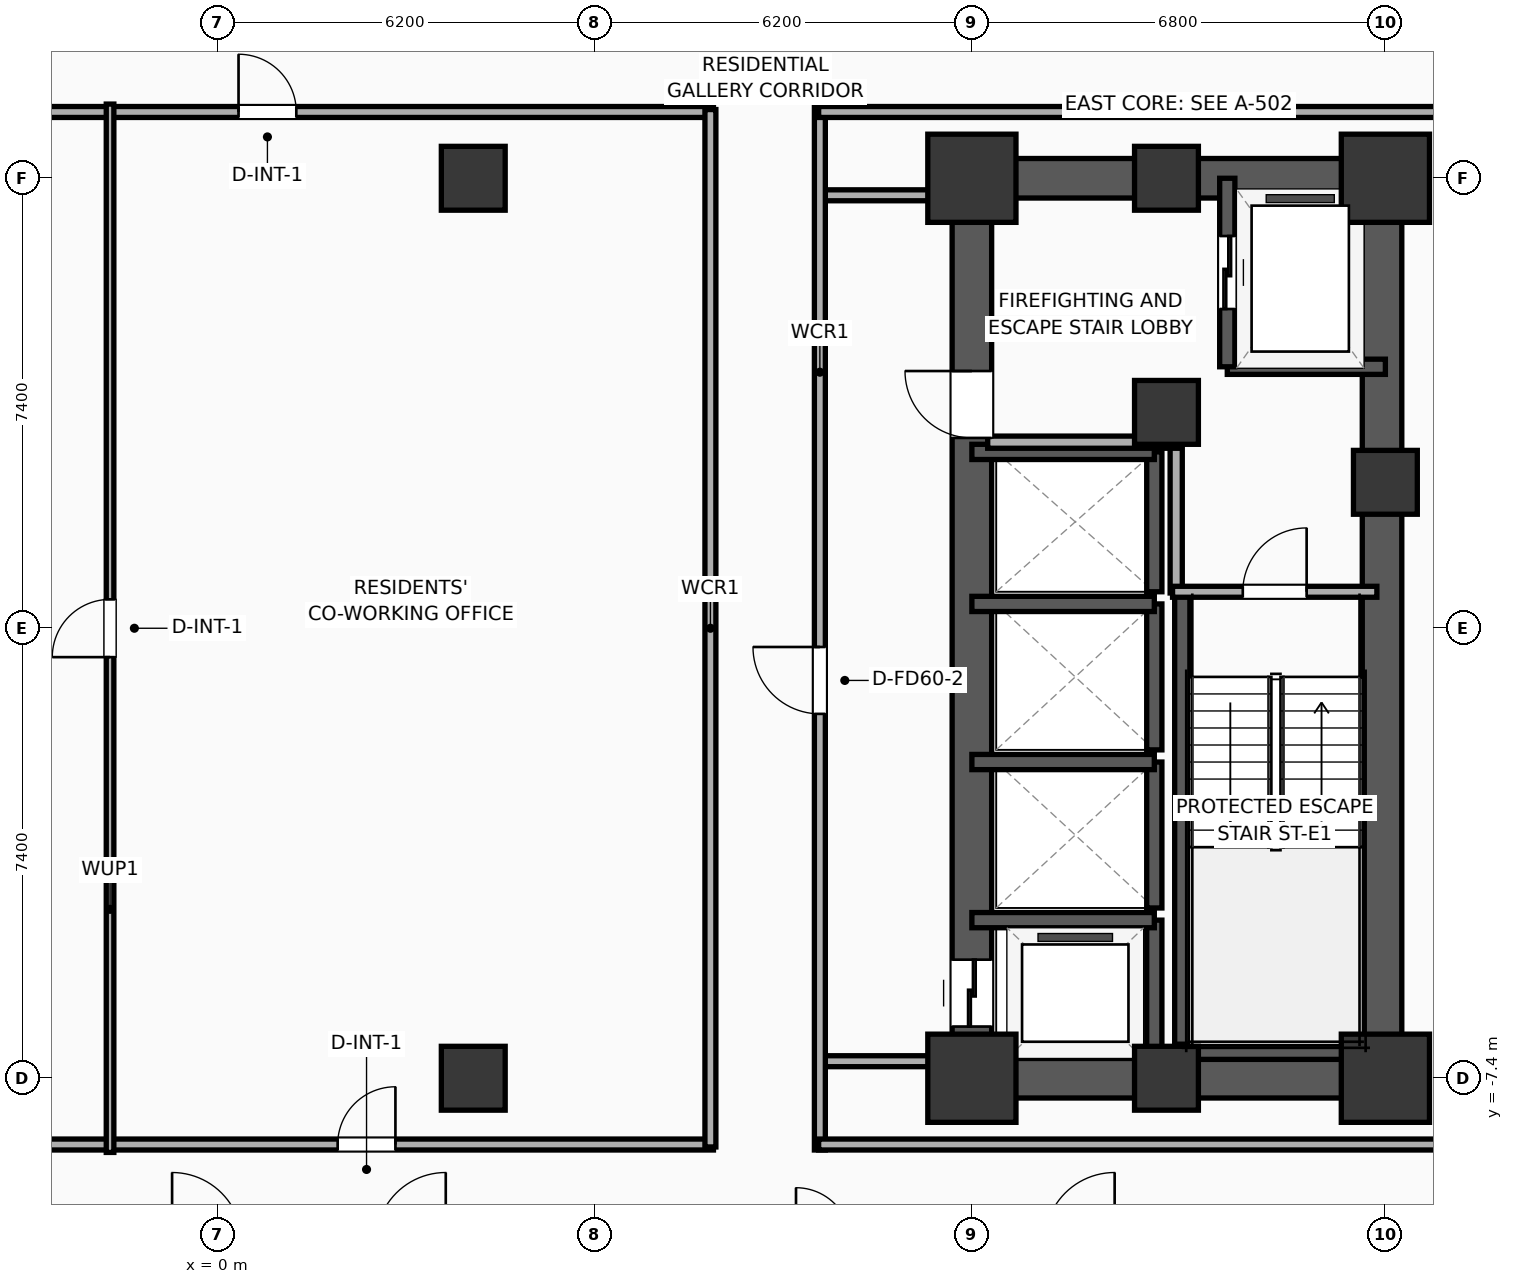
"""IFC4 building model, lengths in metres.
Left out: names, types, materials, properties, quantities, classifications, styles, units other than length and angle.
Written with IfcOpenShell. Run it as: python <this file> out.ifc"""

import sys

from ifc_helpers import new_model, si_unit, direction, frame, frame_2d, origin, origin_2d, place, context, subcontext, project, spatial, rectangle, extrude, element, fill, save


model = new_model("IFC4")
c1 = context("Model", 3, precision=1e-05, world=origin(), true_north=direction((0.0, 1.0)))
c2 = subcontext(c1, "Body", "Model", "MODEL_VIEW")
j1 = project(units=[si_unit("LENGTHUNIT", "METRE"), si_unit("PLANEANGLEUNIT", "RADIAN")], contexts=[c1])
p1 = place(None, origin())
s1 = spatial("IfcSite", under=j1, at=p1, CompositionType="ELEMENT")
p2 = place(p1, origin())
s2 = spatial("IfcBuilding", under=s1, at=p2, CompositionType="ELEMENT")
p3 = place(p2, frame((0.0, 0.0, 33.8)))
s3 = spatial("IfcBuildingStorey", under=s2, at=p3, CompositionType="ELEMENT", Elevation=33.8)
p4 = place(p3, frame((12.4, -7.4, 0.0), z_axis=(0.0, 0.0, 1.0), x_axis=(1.0, 0.0, 0.0)))
e1 = element("IfcColumn", 1, at=p4, inside=s3, PredefinedType="COLUMN", context=c2, shape_type="SweptSolid", body=[
    extrude(rectangle(XDim=1.45, YDim=1.45, at=origin_2d()), origin(), (0.0, 0.0, 1.0), 3.9),
])
p5 = place(p3, frame((15.6, 3.55, 0.0), z_axis=(0.0, 0.0, 1.0), x_axis=(1.0, 0.0, 0.0)))
e2 = element("IfcColumn", 2, at=p5, inside=s3, PredefinedType="COLUMN", context=c2, shape_type="SweptSolid", body=[
    extrude(rectangle(XDim=1.05, YDim=1.05, at=origin_2d()), origin(), (0.0, 0.0, 1.0), 3.9),
])
p6 = place(p3, frame((12.4, 7.4, 0.0), z_axis=(0.0, 0.0, 1.0), x_axis=(1.0, 0.0, 0.0)))
e3 = element("IfcColumn", 3, at=p6, inside=s3, PredefinedType="COLUMN", context=c2, shape_type="SweptSolid", body=[
    extrude(rectangle(XDim=1.45, YDim=1.45, at=origin_2d()), origin(), (0.0, 0.0, 1.0), 3.9),
])
for number, where, z_axis, x_axis in (
    (4, (15.6, -7.4, 0.0), (0.0, 0.0, 1.0), (1.0, 0.0, 0.0)),
    (5, (15.6, 7.4, 0.0), (0.0, 0.0, 1.0), (1.0, 0.0, 0.0)),
):
    element("IfcColumn", number, at=place(p3, frame(where, z_axis=z_axis, x_axis=x_axis)), inside=s3, PredefinedType="COLUMN", context=c2, shape_type="SweptSolid", body=[
        extrude(rectangle(XDim=1.05, YDim=1.05, at=origin_2d()), origin(), (0.0, 0.0, 1.0), 3.9),
    ])
p7 = place(p3, frame((19.2, -7.4, 0.0), z_axis=(0.0, 0.0, 1.0), x_axis=(1.0, 0.0, 0.0)))
e6 = element("IfcColumn", 6, at=p7, inside=s3, PredefinedType="COLUMN", context=c2, shape_type="SweptSolid", body=[
    extrude(rectangle(XDim=1.45, YDim=1.45, at=origin_2d()), origin(), (0.0, 0.0, 1.0), 3.9),
])
p8 = place(p3, frame((19.2, 2.4, 0.0), z_axis=(0.0, 0.0, 1.0), x_axis=(1.0, 0.0, 0.0)))
e7 = element("IfcColumn", 7, at=p8, inside=s3, PredefinedType="COLUMN", context=c2, shape_type="SweptSolid", body=[
    extrude(rectangle(XDim=1.05, YDim=1.05, at=origin_2d()), origin(), (0.0, 0.0, 1.0), 3.9),
])
p9 = place(p3, frame((19.2, 7.4, 0.0), z_axis=(0.0, 0.0, 1.0), x_axis=(1.0, 0.0, 0.0)))
e8 = element("IfcColumn", 8, at=p9, inside=s3, PredefinedType="COLUMN", context=c2, shape_type="SweptSolid", body=[
    extrude(rectangle(XDim=1.45, YDim=1.45, at=origin_2d()), origin(), (0.0, 0.0, 1.0), 3.9),
])
for number, where, z_axis, x_axis in (
    (9, (12.075, -7.4, 0.0), (0.0, 0.0, 1.0), (1.0, 0.0, 0.0)),
    (10, (12.075, 7.4, 0.0), (0.0, 0.0, 1.0), (1.0, 0.0, 0.0)),
):
    element("IfcWall", number, at=place(p3, frame(where, z_axis=z_axis, x_axis=x_axis)), inside=s3, PredefinedType="SHEAR", context=c2, shape_type="SweptSolid", body=[
        extrude(rectangle(XDim=7.45, YDim=0.65, at=frame_2d((3.725, 0.0))), origin(), (0.0, 0.0, 1.0), 3.65),
    ])
p10 = place(p3, frame((12.4, -7.4, 0.0), z_axis=(0.0, 0.0, 1.0), x_axis=(0.0, 1.0, 0.0)))
e11 = element("IfcWall", 11, at=p10, inside=s3, PredefinedType="SHEAR", context=c2, shape_type="SweptSolid", body=[
    extrude(rectangle(XDim=14.8, YDim=0.65, at=frame_2d((7.4, 0.0))), origin(), (0.0, 0.0, 1.0), 3.65),
])
p11 = place(p10, frame((0.85, 0.0, 0.0)))
e12 = element("IfcOpeningElement", 12, at=p11, cuts=e11, PredefinedType="OPENING", context=c2, shape_type="SweptSolid", body=[
    extrude(rectangle(XDim=1.1, YDim=2.05, at=frame_2d((0.55, 1.025))), frame((0.0, 0.335, 0.0), z_axis=(0.0, -1.0, 0.0), x_axis=(1.0, 0.0, 0.0)), (0.0, 0.0, 1.0), 0.67),
])
p12 = place(p10, frame((10.53, 0.0, 0.0)))
e13 = element("IfcOpeningElement", 13, at=p12, cuts=e11, PredefinedType="OPENING", context=c2, shape_type="SweptSolid", body=[
    extrude(rectangle(XDim=1.1, YDim=2.05, at=frame_2d((0.55, 1.025))), frame((0.0, 0.335, 0.0), z_axis=(0.0, -1.0, 0.0), x_axis=(1.0, 0.0, 0.0)), (0.0, 0.0, 1.0), 0.67),
])
p13 = place(p3, frame((19.145, -7.4, 0.0), z_axis=(0.0, 0.0, 1.0), x_axis=(0.0, 1.0, 0.0)))
e14 = element("IfcWall", 14, at=p13, inside=s3, PredefinedType="SHEAR", context=c2, shape_type="SweptSolid", body=[
    extrude(rectangle(XDim=14.8, YDim=0.65, at=frame_2d((7.4, 0.0))), origin(), (0.0, 0.0, 1.0), 3.65),
])
p14 = place(p3, frame((15.86, -7.085, 0.0), z_axis=(0.0, 0.0, 1.0), x_axis=(0.0, 1.0, 0.0)))
e15 = element("IfcWall", 15, at=p14, inside=s3, PredefinedType="SOLIDWALL", context=c2, shape_type="SweptSolid", body=[
    extrude(rectangle(XDim=7.685, YDim=0.25, at=frame_2d((3.843, 0.0))), origin(), (0.0, 0.0, 1.0), 3.65),
])
p15 = place(p3, frame((15.74, -6.965, 0.0), z_axis=(0.0, 0.0, 1.0), x_axis=(1.0, 0.0, 0.0)))
e16 = element("IfcWall", 16, at=p15, inside=s3, PredefinedType="SOLIDWALL", context=c2, shape_type="SweptSolid", body=[
    extrude(rectangle(XDim=3.46, YDim=0.25, at=frame_2d((1.73, 0.0))), origin(), (0.0, 0.0, 1.0), 3.65),
])
for number, where, z_axis, x_axis in (
    (17, (4.2, -7.4, 0.0), (0.0, 0.0, 1.0), (1.0, 0.0, 0.0)),
    (18, (4.2, 7.4, 0.0), (0.0, 0.0, 1.0), (1.0, 0.0, 0.0)),
):
    element("IfcColumn", number, at=place(p3, frame(where, z_axis=z_axis, x_axis=x_axis)), inside=s3, PredefinedType="COLUMN", context=c2, shape_type="SweptSolid", body=[
        extrude(rectangle(XDim=1.05, YDim=1.05, at=origin_2d()), origin(), (0.0, 0.0, 1.0), 3.9),
    ])
p16 = place(p3, frame((16.6, 4.3, 0.0), z_axis=(0.0, 0.0, 1.0), x_axis=(1.0, 0.0, 0.0)))
e19 = element("IfcWall", 19, at=p16, inside=s3, PredefinedType="SOLIDWALL", context=c2, shape_type="SweptSolid", body=[
    extrude(rectangle(XDim=2.6, YDim=0.25, at=frame_2d((1.3, 0.0))), origin(), (0.0, 0.0, 1.0), 3.65),
])
p17 = place(p3, frame((16.6, 7.4, 0.0), z_axis=(0.0, 0.0, 1.0), x_axis=(0.0, -1.0, 0.0)))
e20 = element("IfcWall", 20, at=p17, inside=s3, PredefinedType="SOLIDWALL", context=c2, shape_type="SweptSolid", body=[
    extrude(rectangle(XDim=3.1, YDim=0.25, at=frame_2d((1.55, 0.0))), origin(), (0.0, 0.0, 1.0), 3.65),
])
p18 = place(p17, frame((0.95, 0.0, 0.0)))
e21 = element("IfcOpeningElement", 21, at=p18, cuts=e20, PredefinedType="OPENING", context=c2, shape_type="SweptSolid", body=[
    extrude(rectangle(XDim=1.2, YDim=2.05, at=frame_2d((0.6, 1.025))), frame((0.0, 0.135, 0.0), z_axis=(0.0, -1.0, 0.0), x_axis=(1.0, 0.0, 0.0)), (0.0, 0.0, 1.0), 0.27),
])
p19 = place(p3, frame((15.4, -7.4, 0.0), z_axis=(0.0, 0.0, 1.0), x_axis=(0.0, 1.0, 0.0)))
e22 = element("IfcWall", 22, at=p19, inside=s3, PredefinedType="SOLIDWALL", context=c2, shape_type="SweptSolid", body=[
    extrude(rectangle(XDim=2.6, YDim=0.25, at=frame_2d((1.3, 0.0))), origin(), (0.0, 0.0, 1.0), 3.65),
])
p20 = place(p3, frame((15.4, -4.8, 0.0), z_axis=(0.0, 0.0, 1.0), x_axis=(-1.0, 0.0, 0.0)))
e23 = element("IfcWall", 23, at=p20, inside=s3, PredefinedType="SOLIDWALL", context=c2, shape_type="SweptSolid", body=[
    extrude(rectangle(XDim=3.0, YDim=0.25, at=frame_2d((1.5, 0.0))), origin(), (0.0, 0.0, 1.0), 3.65),
])
p21 = place(p3, frame((15.4, -4.6, 0.0), z_axis=(0.0, 0.0, 1.0), x_axis=(0.0, 1.0, 0.0)))
e24 = element("IfcWall", 24, at=p21, inside=s3, PredefinedType="SOLIDWALL", context=c2, shape_type="SweptSolid", body=[
    extrude(rectangle(XDim=2.4, YDim=0.25, at=frame_2d((1.2, 0.0))), origin(), (0.0, 0.0, 1.0), 3.65),
])
p22 = place(p3, frame((15.4, -2.2, 0.0), z_axis=(0.0, 0.0, 1.0), x_axis=(-1.0, 0.0, 0.0)))
e25 = element("IfcWall", 25, at=p22, inside=s3, PredefinedType="SOLIDWALL", context=c2, shape_type="SweptSolid", body=[
    extrude(rectangle(XDim=3.0, YDim=0.25, at=frame_2d((1.5, 0.0))), origin(), (0.0, 0.0, 1.0), 3.65),
])
p23 = place(p3, frame((15.4, -2.0, 0.0), z_axis=(0.0, 0.0, 1.0), x_axis=(0.0, 1.0, 0.0)))
e26 = element("IfcWall", 26, at=p23, inside=s3, PredefinedType="SOLIDWALL", context=c2, shape_type="SweptSolid", body=[
    extrude(rectangle(XDim=2.4, YDim=0.25, at=frame_2d((1.2, 0.0))), origin(), (0.0, 0.0, 1.0), 3.65),
])
p24 = place(p3, frame((15.4, 0.4, 0.0), z_axis=(0.0, 0.0, 1.0), x_axis=(-1.0, 0.0, 0.0)))
e27 = element("IfcWall", 27, at=p24, inside=s3, PredefinedType="SOLIDWALL", context=c2, shape_type="SweptSolid", body=[
    extrude(rectangle(XDim=3.0, YDim=0.25, at=frame_2d((1.5, 0.0))), origin(), (0.0, 0.0, 1.0), 3.65),
])
p25 = place(p3, frame((15.4, 0.6, 0.0), z_axis=(0.0, 0.0, 1.0), x_axis=(0.0, 1.0, 0.0)))
e28 = element("IfcWall", 28, at=p25, inside=s3, PredefinedType="SOLIDWALL", context=c2, shape_type="SweptSolid", body=[
    extrude(rectangle(XDim=2.3, YDim=0.25, at=frame_2d((1.15, 0.0))), origin(), (0.0, 0.0, 1.0), 3.65),
])
p26 = place(p3, frame((15.4, 2.9, 0.0), z_axis=(0.0, 0.0, 1.0), x_axis=(-1.0, 0.0, 0.0)))
e29 = element("IfcWall", 29, at=p26, inside=s3, PredefinedType="SOLIDWALL", context=c2, shape_type="SweptSolid", body=[
    extrude(rectangle(XDim=3.0, YDim=0.25, at=frame_2d((1.5, 0.0))), origin(), (0.0, 0.0, 1.0), 3.65),
])
p27 = place(p3, frame((15.76, 0.58, 0.0), z_axis=(0.0, 0.0, 1.0), x_axis=(0.0, 1.0, 0.0)))
e30 = element("IfcWall", 30, at=p27, inside=s3, PredefinedType="PARTITIONING", context=c2, shape_type="SweptSolid", body=[
    extrude(rectangle(XDim=2.52, YDim=0.2, at=frame_2d((1.26, 0.0))), origin(), (0.0, 0.0, 1.0), 3.65),
])
p28 = place(p3, frame((12.66, 3.06, 0.0), z_axis=(0.0, 0.0, 1.0), x_axis=(1.0, 0.0, 0.0)))
e31 = element("IfcWall", 31, at=p28, inside=s3, PredefinedType="PARTITIONING", context=c2, shape_type="SweptSolid", body=[
    extrude(rectangle(XDim=3.16, YDim=0.2, at=frame_2d((1.58, 0.0))), origin(), (0.0, 0.0, 1.0), 3.65),
])
p29 = place(p3, frame((15.7, 0.6, 0.0), z_axis=(0.0, 0.0, 1.0), x_axis=(1.0, 0.0, 0.0)))
e32 = element("IfcWall", 32, at=p29, inside=s3, PredefinedType="PARTITIONING", context=c2, shape_type="SweptSolid", body=[
    extrude(rectangle(XDim=3.36, YDim=0.18, at=frame_2d((1.68, 0.0))), origin(), (0.0, 0.0, 1.0), 3.65),
])
p30 = place(p29, frame((1.155, 0.0, 0.0)))
e33 = element("IfcOpeningElement", 33, at=p30, cuts=e32, PredefinedType="OPENING", context=c2, shape_type="SweptSolid", body=[
    extrude(rectangle(XDim=1.05, YDim=2.05, at=frame_2d((0.525, 1.025))), frame((0.0, 0.1, 0.0), z_axis=(0.0, -1.0, 0.0), x_axis=(1.0, 0.0, 0.0)), (0.0, 0.0, 1.0), 0.2),
])
for number, where, z_axis, x_axis in (
    (34, (9.88, 7.12, 0.0), (0.0, 0.0, 1.0), (1.0, 0.0, 0.0)),
    (35, (9.88, -7.12, 0.0), (0.0, 0.0, 1.0), (1.0, 0.0, 0.0)),
):
    element("IfcWall", number, at=place(p3, frame(where, z_axis=z_axis, x_axis=x_axis)), inside=s3, PredefinedType="PARTITIONING", context=c2, shape_type="SweptSolid", body=[
        extrude(rectangle(XDim=2.27, YDim=0.18, at=frame_2d((1.135, 0.0))), origin(), (0.0, 0.0, 1.0), 2.94),
    ])
p31 = place(p3, frame((9.9, -8.58, 0.0), z_axis=(0.0, 0.0, 1.0), x_axis=(0.0, 1.0, 0.0)))
e36 = element("IfcWall", 36, at=p31, inside=s3, PredefinedType="PARTITIONING", context=c2, shape_type="SweptSolid", body=[
    extrude(rectangle(XDim=17.16, YDim=0.18, at=frame_2d((8.58, 0.0))), origin(), (0.0, 0.0, 1.0), 3.65),
])
p32 = place(p31, frame((7.172, 0.0, 0.0)))
e37 = element("IfcOpeningElement", 37, at=p32, cuts=e36, PredefinedType="OPENING", context=c2, shape_type="SweptSolid", body=[
    extrude(rectangle(XDim=1.1, YDim=2.05, at=frame_2d((0.55, 1.025))), frame((0.0, 0.1, 0.0), z_axis=(0.0, -1.0, 0.0), x_axis=(1.0, 0.0, 0.0)), (0.0, 0.0, 1.0), 0.2),
])
p33 = place(p3, frame((9.88, 8.49, 0.0), z_axis=(0.0, 0.0, 1.0), x_axis=(1.0, 0.0, 0.0)))
e38 = element("IfcWall", 38, at=p33, inside=s3, PredefinedType="PARTITIONING", context=c2, shape_type="SweptSolid", body=[
    extrude(rectangle(XDim=16.33, YDim=0.18, at=frame_2d((8.165, 0.0))), origin(), (0.0, 0.0, 1.0), 3.65),
])
p34 = place(p33, frame((14.365, 0.0, 0.0)))
e39 = element("IfcOpeningElement", 39, at=p34, cuts=e38, PredefinedType="OPENING", context=c2, shape_type="SweptSolid", body=[
    extrude(rectangle(XDim=0.9, YDim=2.05, at=frame_2d((0.45, 1.025))), frame((0.0, 0.1, 0.0), z_axis=(0.0, -1.0, 0.0), x_axis=(1.0, 0.0, 0.0)), (0.0, 0.0, 1.0), 0.2),
])
p35 = place(p3, frame((9.88, -8.49, 0.0), z_axis=(0.0, 0.0, 1.0), x_axis=(1.0, 0.0, 0.0)))
e40 = element("IfcWall", 40, at=p35, inside=s3, PredefinedType="PARTITIONING", context=c2, shape_type="SweptSolid", body=[
    extrude(rectangle(XDim=16.33, YDim=0.18, at=frame_2d((8.165, 0.0))), origin(), (0.0, 0.0, 1.0), 3.65),
])
p36 = place(p3, frame((-8.15, 8.49, 0.0), z_axis=(0.0, 0.0, 1.0), x_axis=(1.0, 0.0, 0.0)))
e41 = element("IfcWall", 41, at=p36, inside=s3, PredefinedType="PARTITIONING", context=c2, shape_type="SweptSolid", body=[
    extrude(rectangle(XDim=16.3, YDim=0.18, at=frame_2d((8.15, 0.0))), origin(), (0.0, 0.0, 1.0), 3.65),
])
p37 = place(p36, frame((8.49, 0.0, 0.0)))
e42 = element("IfcOpeningElement", 42, at=p37, cuts=e41, PredefinedType="OPENING", context=c2, shape_type="SweptSolid", body=[
    extrude(rectangle(XDim=0.95, YDim=2.05, at=frame_2d((0.475, 1.025))), frame((0.0, 0.1, 0.0), z_axis=(0.0, -1.0, 0.0), x_axis=(1.0, 0.0, 0.0)), (0.0, 0.0, 1.0), 0.2),
])
p38 = place(p3, frame((-8.15, -8.49, 0.0), z_axis=(0.0, 0.0, 1.0), x_axis=(1.0, 0.0, 0.0)))
e43 = element("IfcWall", 43, at=p38, inside=s3, PredefinedType="PARTITIONING", context=c2, shape_type="SweptSolid", body=[
    extrude(rectangle(XDim=16.3, YDim=0.18, at=frame_2d((8.15, 0.0))), origin(), (0.0, 0.0, 1.0), 3.65),
])
p39 = place(p38, frame((1.13, 0.0, 0.0)))
e44 = element("IfcOpeningElement", 44, at=p39, cuts=e43, PredefinedType="OPENING", context=c2, shape_type="SweptSolid", body=[
    extrude(rectangle(XDim=1.0, YDim=2.05, at=frame_2d((0.5, 1.025))), frame((0.0, 0.1, 0.0), z_axis=(0.0, -1.0, 0.0), x_axis=(1.0, 0.0, 0.0)), (0.0, 0.0, 1.0), 0.2),
])
p40 = place(p38, frame((10.12, 0.0, 0.0)))
e45 = element("IfcOpeningElement", 45, at=p40, cuts=e43, PredefinedType="OPENING", context=c2, shape_type="SweptSolid", body=[
    extrude(rectangle(XDim=0.95, YDim=2.05, at=frame_2d((0.475, 1.025))), frame((0.0, 0.1, 0.0), z_axis=(0.0, -1.0, 0.0), x_axis=(1.0, 0.0, 0.0)), (0.0, 0.0, 1.0), 0.2),
])
p41 = place(p3, frame((8.1, -8.53, 0.0), z_axis=(0.0, 0.0, 1.0), x_axis=(0.0, 1.0, 0.0)))
e46 = element("IfcWall", 46, at=p41, inside=s3, PredefinedType="PARTITIONING", context=c2, shape_type="SweptSolid", body=[
    extrude(rectangle(XDim=17.06, YDim=0.18, at=frame_2d((8.53, 0.0))), origin(), (0.0, 0.0, 1.0), 3.65),
])
p42 = place(p3, frame((-1.773, -8.62, 0.0), z_axis=(0.0, 0.0, 1.0), x_axis=(0.0, 1.0, 0.0)))
e47 = element("IfcWall", 47, at=p42, inside=s3, PredefinedType="PARTITIONING", context=c2, shape_type="SweptSolid", body=[
    extrude(rectangle(XDim=17.24, YDim=0.125, at=frame_2d((8.62, 0.0))), origin(), (0.0, 0.0, 1.0), 3.65),
])
p43 = place(p42, frame((8.145, 0.0, 0.0)))
e48 = element("IfcOpeningElement", 48, at=p43, cuts=e47, PredefinedType="OPENING", context=c2, shape_type="SweptSolid", body=[
    extrude(rectangle(XDim=0.95, YDim=2.05, at=frame_2d((0.475, 1.025))), frame((0.0, 0.073, 0.0), z_axis=(0.0, -1.0, 0.0), x_axis=(1.0, 0.0, 0.0)), (0.0, 0.0, 1.0), 0.145),
])
p44 = place(p18, origin())
e49 = element("IfcDoor", 49, at=p44, inside=s3, OperationType="SLIDING_TO_LEFT", PredefinedType="DOOR", context=c2, shape_type="SweptSolid", body=[
    extrude(rectangle(XDim=1.2, YDim=2.05, at=frame_2d((0.6, 1.025))), frame((0.0, 0.025, 0.0), z_axis=(0.0, -1.0, 0.0), x_axis=(1.0, 0.0, 0.0)), (0.0, 0.0, 1.0), 0.05),
])
fill(e21, e49)
p45 = place(p11, origin())
e50 = element("IfcDoor", 50, at=p45, inside=s3, OperationType="SLIDING_TO_LEFT", PredefinedType="DOOR", context=c2, shape_type="SweptSolid", body=[
    extrude(rectangle(XDim=1.1, YDim=2.05, at=frame_2d((0.55, 1.025))), frame((0.0, 0.025, 0.0), z_axis=(0.0, -1.0, 0.0), x_axis=(1.0, 0.0, 0.0)), (0.0, 0.0, 1.0), 0.05),
])
fill(e12, e50)
p46 = place(p30, origin())
e51 = element("IfcDoor", 51, at=p46, inside=s3, OperationType="SINGLE_SWING_RIGHT", PredefinedType="DOOR", context=c2, shape_type="SweptSolid", body=[
    extrude(rectangle(XDim=1.05, YDim=2.05, at=frame_2d((0.525, 1.025))), frame((0.0, 0.025, 0.0), z_axis=(0.0, -1.0, 0.0), x_axis=(1.0, 0.0, 0.0)), (0.0, 0.0, 1.0), 0.05),
])
fill(e33, e51)
p47 = place(p32, origin())
e52 = element("IfcDoor", 52, at=p47, inside=s3, OperationType="SINGLE_SWING_RIGHT", PredefinedType="DOOR", context=c2, shape_type="SweptSolid", body=[
    extrude(rectangle(XDim=1.1, YDim=2.05, at=frame_2d((0.55, 1.025))), frame((0.0, 0.025, 0.0), z_axis=(0.0, -1.0, 0.0), x_axis=(1.0, 0.0, 0.0)), (0.0, 0.0, 1.0), 0.05),
])
fill(e37, e52)
p48 = place(p37, origin())
e53 = element("IfcDoor", 53, at=p48, inside=s3, OperationType="SINGLE_SWING_LEFT", PredefinedType="DOOR", context=c2, shape_type="SweptSolid", body=[
    extrude(rectangle(XDim=0.95, YDim=2.05, at=frame_2d((0.475, 1.025))), frame((0.0, 0.025, 0.0), z_axis=(0.0, -1.0, 0.0), x_axis=(1.0, 0.0, 0.0)), (0.0, 0.0, 1.0), 0.05),
])
fill(e42, e53)
p49 = place(p40, origin())
e54 = element("IfcDoor", 54, at=p49, inside=s3, OperationType="SINGLE_SWING_RIGHT", PredefinedType="DOOR", context=c2, shape_type="SweptSolid", body=[
    extrude(rectangle(XDim=0.95, YDim=2.05, at=frame_2d((0.475, 1.025))), frame((0.0, 0.025, 0.0), z_axis=(0.0, -1.0, 0.0), x_axis=(1.0, 0.0, 0.0)), (0.0, 0.0, 1.0), 0.05),
])
fill(e45, e54)
p50 = place(p43, origin())
e55 = element("IfcDoor", 55, at=p50, inside=s3, OperationType="SINGLE_SWING_LEFT", PredefinedType="DOOR", context=c2, shape_type="SweptSolid", body=[
    extrude(rectangle(XDim=0.95, YDim=2.05, at=frame_2d((0.475, 1.025))), frame((0.0, 0.025, 0.0), z_axis=(0.0, -1.0, 0.0), x_axis=(1.0, 0.0, 0.0)), (0.0, 0.0, 1.0), 0.05),
])
fill(e48, e55)
p51 = place(p12, origin())
e56 = element("IfcDoor", 56, at=p51, inside=s3, OperationType="SINGLE_SWING_RIGHT", PredefinedType="DOOR", context=c2, shape_type="SweptSolid", body=[
    extrude(rectangle(XDim=1.1, YDim=2.05, at=frame_2d((0.55, 1.025))), frame((0.0, 0.025, 0.0), z_axis=(0.0, -1.0, 0.0), x_axis=(1.0, 0.0, 0.0)), (0.0, 0.0, 1.0), 0.05),
])
fill(e13, e56)
save(model, sys.argv[1])
